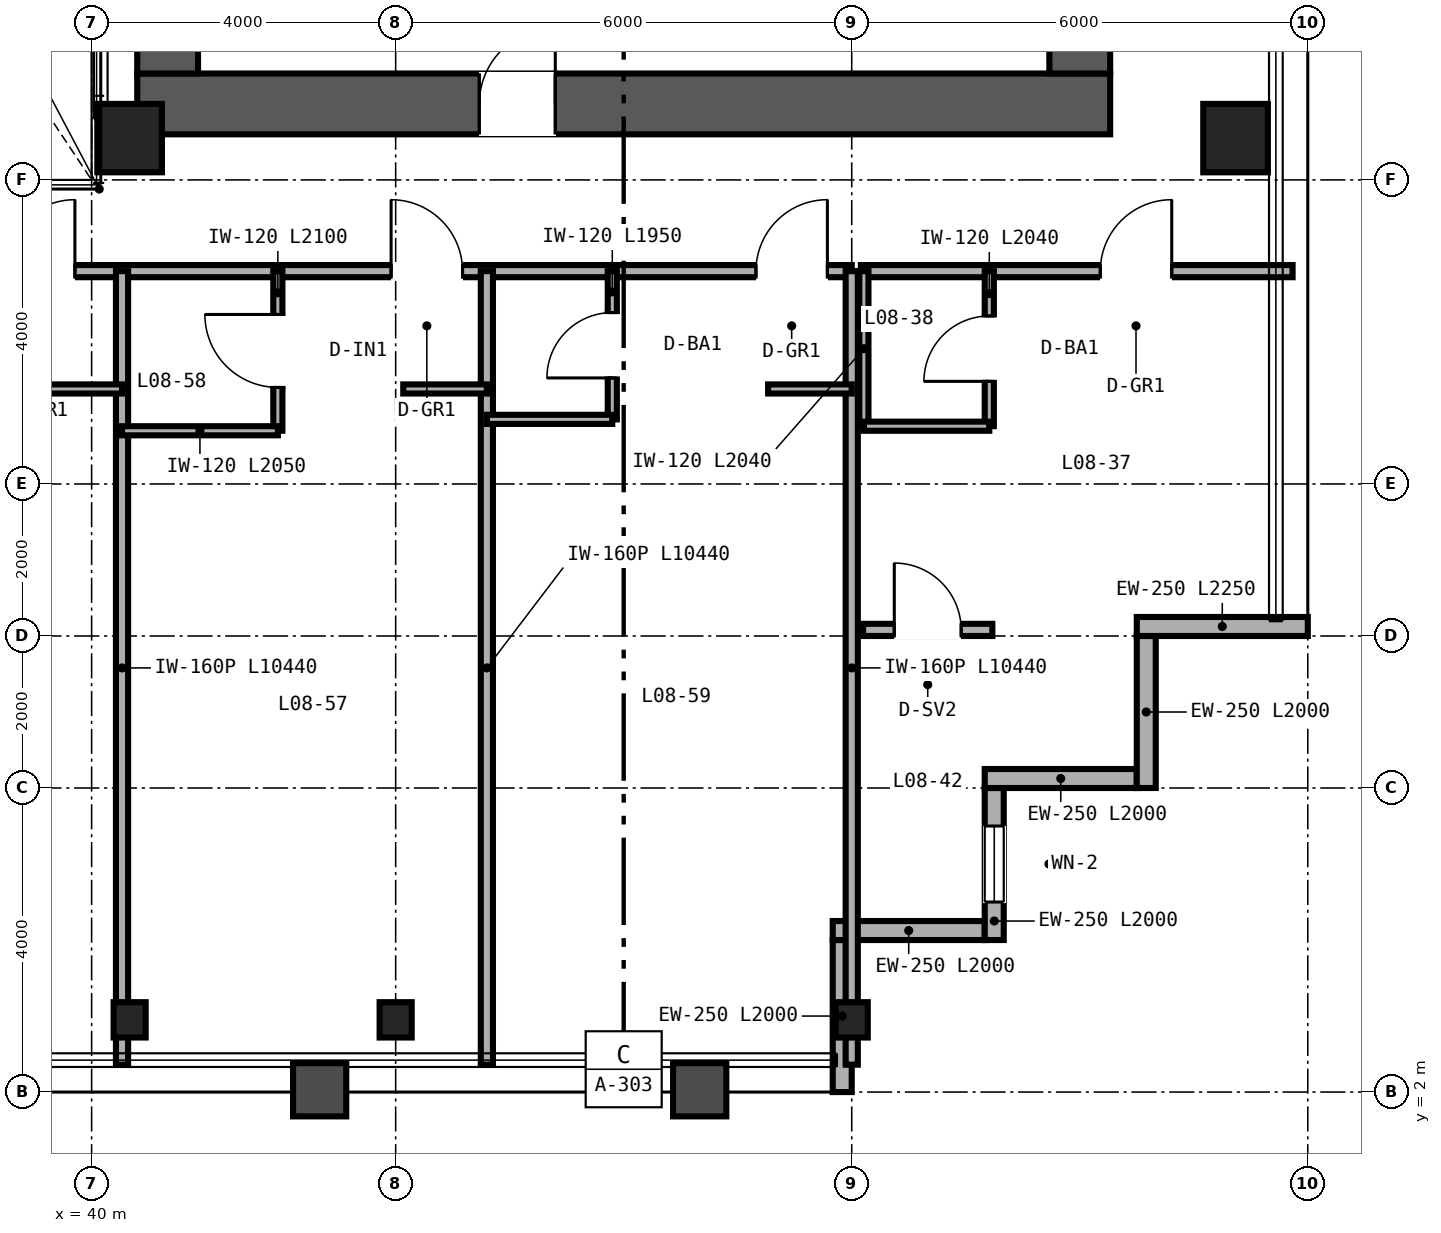
"""IFC4 building model, lengths in metres.
Left out: names, types, materials, properties, quantities, classifications, styles, units other than length and angle.
Written with IfcOpenShell. Run it as: python <this file> out.ifc"""

import sys

from ifc_helpers import new_model, si_unit, direction, frame, frame_2d, origin, origin_2d, place, context, subcontext, project, spatial, rectangle, hollow_rectangle, i_section, extrude, source, transform, mapped, element, fill, save


model = new_model("IFC4")
c1 = context("Model", 3, precision=1e-05, world=origin(), true_north=direction((0.0, 1.0)))
c2 = subcontext(c1, "Body", "Model", "MODEL_VIEW")
j1 = project(units=[si_unit("LENGTHUNIT", "METRE"), si_unit("PLANEANGLEUNIT", "RADIAN")], contexts=[c1])
p1 = place(None, origin())
s1 = spatial("IfcSite", under=j1, at=p1, CompositionType="ELEMENT")
p2 = place(p1, origin())
s2 = spatial("IfcBuilding", under=s1, at=p2, CompositionType="ELEMENT")
p3 = place(p2, frame((0.0, 0.0, 38.4)))
s3 = spatial("IfcBuildingStorey", under=s2, at=p3, CompositionType="ELEMENT", Elevation=38.4)
p4 = place(p3, frame((40.6, 15.0, 0.0), z_axis=(0.0, 0.0, 1.0), x_axis=(1.0, 0.0, 0.0)))
e1 = element("IfcWall", 1, at=p4, inside=s3, PredefinedType="SHEAR", context=c2, shape_type="SweptSolid", body=[
    extrude(rectangle(XDim=12.8, YDim=0.8, at=frame_2d((6.4, 0.0))), origin(), (0.0, 0.0, 1.0), 3.35),
])
p5 = place(p4, frame((4.5, 0.0, 0.0)))
e2 = element("IfcOpeningElement", 2, at=p5, cuts=e1, PredefinedType="OPENING", context=c2, shape_type="SweptSolid", body=[
    extrude(rectangle(XDim=1.0, YDim=2.15, at=frame_2d((0.5, 1.075))), frame((0.0, 0.41, 0.0), z_axis=(0.0, -1.0, 0.0), x_axis=(1.0, 0.0, 0.0)), (0.0, 0.0, 1.0), 0.82),
])
for number, where, z_axis, x_axis in (
    (3, (41.0, 15.4, 0.0), (0.0, 0.0, 1.0), (0.0, 1.0, 0.0)),
    (4, (53.0, 15.4, 0.0), (0.0, 0.0, 1.0), (0.0, 1.0, 0.0)),
):
    element("IfcWall", number, at=place(p3, frame(where, z_axis=z_axis, x_axis=x_axis)), inside=s3, PredefinedType="SHEAR", context=c2, shape_type="SweptSolid", body=[
        extrude(rectangle(XDim=21.2, YDim=0.8, at=frame_2d((10.6, 0.0))), origin(), (0.0, 0.0, 1.0), 3.35),
    ])
m1 = source(origin(), c2, "Body", "SweptSolid", [
    extrude(hollow_rectangle(XDim=0.85, YDim=0.9, WallThickness=0.04, at=origin_2d()), origin(), (0.0, 0.0, 1.0), 3.35),
])
for number, where, z_axis, x_axis in (
    (5, (40.5, 14.55, 0.0), (0.0, 0.0, 1.0), (1.0, 0.0, 0.0)),
    (6, (55.05, 14.55, 0.0), (0.0, 0.0, 1.0), (1.0, 0.0, 0.0)),
):
    element("IfcColumn", number, at=place(p3, frame(where, z_axis=z_axis, x_axis=x_axis)), inside=s3, PredefinedType="COLUMN", context=c2, shape_type="MappedRepresentation", body=[
        mapped(m1, transform((0.0, 0.0, 0.0), scale=1.0)),
    ])
m2 = source(origin(), c2, "Body", "SweptSolid", [
    extrude(i_section(OverallWidth=0.422, OverallDepth=0.465, WebThickness=0.045, FlangeThickness=0.073, FilletRadius=0.025, at=origin_2d()), origin(), (0.0, 0.0, 1.0), 3.35),
])
for number, where, z_axis, x_axis in (
    (7, (40.5, 2.95, 0.0), (0.0, 0.0, 1.0), (1.0, 0.0, 0.0)),
    (8, (44.0, 2.95, 0.0), (0.0, 0.0, 1.0), (1.0, 0.0, 0.0)),
    (9, (50.0, 2.95, 0.0), (0.0, 0.0, 1.0), (1.0, 0.0, 0.0)),
):
    element("IfcColumn", number, at=place(p3, frame(where, z_axis=z_axis, x_axis=x_axis)), inside=s3, PredefinedType="COLUMN", context=c2, shape_type="MappedRepresentation", body=[
        mapped(m2, transform((0.0, 0.0, 0.0), scale=1.0)),
    ])
p6 = place(p3, frame((49.875, 2.0, 0.0), z_axis=(0.0, 0.0, 1.0), x_axis=(0.0, 1.0, 0.0)))
e10 = element("IfcWall", 10, at=p6, inside=s3, PredefinedType="SOLIDWALL", context=c2, shape_type="SweptSolid", body=[
    extrude(rectangle(XDim=2.0, YDim=0.25, at=frame_2d((1.0, 0.0))), origin(), (0.0, 0.0, 1.0), 2.657),
])
p7 = place(p3, frame((49.75, 4.125, 0.0), z_axis=(0.0, 0.0, 1.0), x_axis=(1.0, 0.0, 0.0)))
e11 = element("IfcWall", 11, at=p7, inside=s3, PredefinedType="SOLIDWALL", context=c2, shape_type="SweptSolid", body=[
    extrude(rectangle(XDim=2.0, YDim=0.25, at=frame_2d((1.0, 0.0))), origin(), (0.0, 0.0, 1.0), 3.35),
])
p8 = place(p3, frame((51.875, 4.0, 0.0), z_axis=(0.0, 0.0, 1.0), x_axis=(0.0, 1.0, 0.0)))
e12 = element("IfcWall", 12, at=p8, inside=s3, PredefinedType="SOLIDWALL", context=c2, shape_type="SweptSolid", body=[
    extrude(rectangle(XDim=2.0, YDim=0.25, at=frame_2d((1.0, 0.0))), origin(), (0.0, 0.0, 1.0), 3.35),
])
p9 = place(p8, frame((0.5, 0.0, 0.85)))
e13 = element("IfcOpeningElement", 13, at=p9, cuts=e12, PredefinedType="OPENING", context=c2, shape_type="SweptSolid", body=[
    extrude(rectangle(XDim=1.0, YDim=1.9, at=frame_2d((0.5, 0.95))), frame((0.0, 0.135, 0.0), z_axis=(0.0, -1.0, 0.0), x_axis=(1.0, 0.0, 0.0)), (0.0, 0.0, 1.0), 0.27),
])
for number, where, z_axis, x_axis in (
    (14, (51.75, 6.125, 0.0), (0.0, 0.0, 1.0), (1.0, 0.0, 0.0)),
    (15, (53.875, 6.0, 0.0), (0.0, 0.0, 1.0), (0.0, 1.0, 0.0)),
):
    element("IfcWall", number, at=place(p3, frame(where, z_axis=z_axis, x_axis=x_axis)), inside=s3, PredefinedType="SOLIDWALL", context=c2, shape_type="SweptSolid", body=[
        extrude(rectangle(XDim=2.0, YDim=0.25, at=frame_2d((1.0, 0.0))), origin(), (0.0, 0.0, 1.0), 3.35),
    ])
p10 = place(p3, frame((53.75, 8.125, 0.0), z_axis=(0.0, 0.0, 1.0), x_axis=(1.0, 0.0, 0.0)))
e16 = element("IfcWall", 16, at=p10, inside=s3, PredefinedType="SOLIDWALL", context=c2, shape_type="SweptSolid", body=[
    extrude(rectangle(XDim=2.25, YDim=0.25, at=frame_2d((1.125, 0.0))), origin(), (0.0, 0.0, 1.0), 3.35),
])
p11 = place(p3, frame((50.12, 12.8, 0.0), z_axis=(0.0, 0.0, 1.0), x_axis=(1.0, 0.0, 0.0)))
e17 = element("IfcWall", 17, at=p11, inside=s3, PredefinedType="PARTITIONING", context=c2, shape_type="SweptSolid", body=[
    extrude(rectangle(XDim=5.68, YDim=0.16, at=frame_2d((2.84, 0.0))), origin(), (0.0, 0.0, 1.0), 3.35),
])
p12 = place(p11, frame((3.15, 0.0, 0.0)))
e18 = element("IfcOpeningElement", 18, at=p12, cuts=e17, PredefinedType="OPENING", context=c2, shape_type="SweptSolid", body=[
    extrude(rectangle(XDim=0.94, YDim=2.15, at=frame_2d((0.47, 1.075))), frame((0.0, 0.09, 0.0), z_axis=(0.0, -1.0, 0.0), x_axis=(1.0, 0.0, 0.0)), (0.0, 0.0, 1.0), 0.18),
])
p13 = place(p3, frame((51.81, 10.76, 0.0), z_axis=(0.0, 0.0, 1.0), x_axis=(0.0, 1.0, 0.0)))
e19 = element("IfcWall", 19, at=p13, inside=s3, PredefinedType="PARTITIONING", context=c2, shape_type="SweptSolid", body=[
    extrude(rectangle(XDim=2.04, YDim=0.12, at=frame_2d((1.02, 0.0))), origin(), (0.0, 0.0, 1.0), 3.35),
])
p14 = place(p13, frame((0.59, 0.0, 0.0)))
e20 = element("IfcOpeningElement", 20, at=p14, cuts=e19, PredefinedType="OPENING", context=c2, shape_type="SweptSolid", body=[
    extrude(rectangle(XDim=0.86, YDim=2.1, at=frame_2d((0.43, 1.05))), frame((0.0, 0.07, 0.0), z_axis=(0.0, -1.0, 0.0), x_axis=(1.0, 0.0, 0.0)), (0.0, 0.0, 1.0), 0.14),
])
p15 = place(p3, frame((50.16, 10.76, 0.0), z_axis=(0.0, 0.0, 1.0), x_axis=(0.0, 1.0, 0.0)))
e21 = element("IfcWall", 21, at=p15, inside=s3, PredefinedType="PARTITIONING", context=c2, shape_type="SweptSolid", body=[
    extrude(rectangle(XDim=2.04, YDim=0.12, at=frame_2d((1.02, 0.0))), origin(), (0.0, 0.0, 1.0), 3.35),
])
p16 = place(p3, frame((50.16, 10.76, 0.0), z_axis=(0.0, 0.0, 1.0), x_axis=(1.0, 0.0, 0.0)))
e22 = element("IfcWall", 22, at=p16, inside=s3, PredefinedType="PARTITIONING", context=c2, shape_type="SweptSolid", body=[
    extrude(rectangle(XDim=1.65, YDim=0.12, at=frame_2d((0.825, 0.0))), origin(), (0.0, 0.0, 1.0), 3.35),
])
p17 = place(p3, frame((50.15, 8.08, 0.0), z_axis=(0.0, 0.0, 1.0), x_axis=(1.0, 0.0, 0.0)))
e23 = element("IfcWall", 23, at=p17, inside=s3, PredefinedType="PARTITIONING", context=c2, shape_type="SweptSolid", body=[
    extrude(rectangle(XDim=1.7, YDim=0.16, at=frame_2d((0.85, 0.0))), origin(), (0.0, 0.0, 1.0), 3.35),
])
p18 = place(p17, frame((0.41, 0.0, 0.0)))
e24 = element("IfcOpeningElement", 24, at=p18, cuts=e23, PredefinedType="OPENING", context=c2, shape_type="SweptSolid", body=[
    extrude(rectangle(XDim=0.88, YDim=2.15, at=frame_2d((0.44, 1.075))), frame((0.0, 0.09, 0.0), z_axis=(0.0, -1.0, 0.0), x_axis=(1.0, 0.0, 0.0)), (0.0, 0.0, 1.0), 0.18),
])
p19 = place(p3, frame((14.0, 12.8, 0.0), z_axis=(0.0, 0.0, 1.0), x_axis=(1.0, 0.0, 0.0)))
e25 = element("IfcWall", 25, at=p19, inside=s3, PredefinedType="PARTITIONING", context=c2, shape_type="SweptSolid", body=[
    extrude(rectangle(XDim=36.0, YDim=0.16, at=frame_2d((18.0, 0.0))), origin(), (0.0, 0.0, 1.0), 2.571),
])
p20 = place(p19, frame((2.94, 0.0, 0.0)))
e26 = element("IfcOpeningElement", 26, at=p20, cuts=e25, PredefinedType="OPENING", context=c2, shape_type="SweptSolid", body=[
    extrude(rectangle(XDim=0.94, YDim=2.15, at=frame_2d((0.47, 1.075))), frame((0.0, 0.09, 0.0), z_axis=(0.0, -1.0, 0.0), x_axis=(1.0, 0.0, 0.0)), (0.0, 0.0, 1.0), 0.18),
])
p21 = place(p19, frame((7.14, 0.0, 0.0)))
e27 = element("IfcOpeningElement", 27, at=p21, cuts=e25, PredefinedType="OPENING", context=c2, shape_type="SweptSolid", body=[
    extrude(rectangle(XDim=0.94, YDim=2.15, at=frame_2d((0.47, 1.075))), frame((0.0, 0.09, 0.0), z_axis=(0.0, -1.0, 0.0), x_axis=(1.0, 0.0, 0.0)), (0.0, 0.0, 1.0), 0.18),
])
p22 = place(p19, frame((11.54, 0.0, 0.0)))
e28 = element("IfcOpeningElement", 28, at=p22, cuts=e25, PredefinedType="OPENING", context=c2, shape_type="SweptSolid", body=[
    extrude(rectangle(XDim=0.94, YDim=2.15, at=frame_2d((0.47, 1.075))), frame((0.0, 0.09, 0.0), z_axis=(0.0, -1.0, 0.0), x_axis=(1.0, 0.0, 0.0)), (0.0, 0.0, 1.0), 0.18),
])
p23 = place(p19, frame((15.94, 0.0, 0.0)))
e29 = element("IfcOpeningElement", 29, at=p23, cuts=e25, PredefinedType="OPENING", context=c2, shape_type="SweptSolid", body=[
    extrude(rectangle(XDim=0.94, YDim=2.15, at=frame_2d((0.47, 1.075))), frame((0.0, 0.09, 0.0), z_axis=(0.0, -1.0, 0.0), x_axis=(1.0, 0.0, 0.0)), (0.0, 0.0, 1.0), 0.18),
])
p24 = place(p19, frame((20.54, 0.0, 0.0)))
e30 = element("IfcOpeningElement", 30, at=p24, cuts=e25, PredefinedType="OPENING", context=c2, shape_type="SweptSolid", body=[
    extrude(rectangle(XDim=0.94, YDim=2.15, at=frame_2d((0.47, 1.075))), frame((0.0, 0.09, 0.0), z_axis=(0.0, -1.0, 0.0), x_axis=(1.0, 0.0, 0.0)), (0.0, 0.0, 1.0), 0.18),
])
p25 = place(p19, frame((24.84, 0.0, 0.0)))
e31 = element("IfcOpeningElement", 31, at=p25, cuts=e25, PredefinedType="OPENING", context=c2, shape_type="SweptSolid", body=[
    extrude(rectangle(XDim=0.94, YDim=2.15, at=frame_2d((0.47, 1.075))), frame((0.0, 0.09, 0.0), z_axis=(0.0, -1.0, 0.0), x_axis=(1.0, 0.0, 0.0)), (0.0, 0.0, 1.0), 0.18),
])
p26 = place(p19, frame((29.94, 0.0, 0.0)))
e32 = element("IfcOpeningElement", 32, at=p26, cuts=e25, PredefinedType="OPENING", context=c2, shape_type="SweptSolid", body=[
    extrude(rectangle(XDim=0.94, YDim=2.15, at=frame_2d((0.47, 1.075))), frame((0.0, 0.09, 0.0), z_axis=(0.0, -1.0, 0.0), x_axis=(1.0, 0.0, 0.0)), (0.0, 0.0, 1.0), 0.18),
])
p27 = place(p19, frame((34.74, 0.0, 0.0)))
e33 = element("IfcOpeningElement", 33, at=p27, cuts=e25, PredefinedType="OPENING", context=c2, shape_type="SweptSolid", body=[
    extrude(rectangle(XDim=0.94, YDim=2.15, at=frame_2d((0.47, 1.075))), frame((0.0, 0.09, 0.0), z_axis=(0.0, -1.0, 0.0), x_axis=(1.0, 0.0, 0.0)), (0.0, 0.0, 1.0), 0.18),
])
p28 = place(p3, frame((50.0, 2.36, 0.0), z_axis=(0.0, 0.0, 1.0), x_axis=(0.0, 1.0, 0.0)))
e34 = element("IfcWall", 34, at=p28, inside=s3, PredefinedType="PARTITIONING", context=c2, shape_type="SweptSolid", body=[
    extrude(rectangle(XDim=10.44, YDim=0.16, at=frame_2d((5.22, 0.0))), origin(), (0.0, 0.0, 1.0), 2.657),
])
p29 = place(p3, frame((40.4, 2.36, 0.0), z_axis=(0.0, 0.0, 1.0), x_axis=(0.0, 1.0, 0.0)))
e35 = element("IfcWall", 35, at=p29, inside=s3, PredefinedType="PARTITIONING", context=c2, shape_type="SweptSolid", body=[
    extrude(rectangle(XDim=10.44, YDim=0.16, at=frame_2d((5.22, 0.0))), origin(), (0.0, 0.0, 1.0), 2.423),
])
p30 = place(p3, frame((39.3, 11.25, 0.0), z_axis=(0.0, 0.0, 1.0), x_axis=(1.0, 0.0, 0.0)))
e36 = element("IfcWall", 36, at=p30, inside=s3, PredefinedType="PARTITIONING", context=c2, shape_type="SweptSolid", body=[
    extrude(rectangle(XDim=1.1, YDim=0.12, at=frame_2d((0.55, 0.0))), origin(), (0.0, 0.0, 1.0), 2.571),
])
p31 = place(p3, frame((45.2, 2.36, 0.0), z_axis=(0.0, 0.0, 1.0), x_axis=(0.0, 1.0, 0.0)))
e37 = element("IfcWall", 37, at=p31, inside=s3, PredefinedType="PARTITIONING", context=c2, shape_type="SweptSolid", body=[
    extrude(rectangle(XDim=10.44, YDim=0.16, at=frame_2d((5.22, 0.0))), origin(), (0.0, 0.0, 1.0), 2.657),
])
p32 = place(p3, frame((42.45, 10.7, 0.0), z_axis=(0.0, 0.0, 1.0), x_axis=(0.0, 1.0, 0.0)))
e38 = element("IfcWall", 38, at=p32, inside=s3, PredefinedType="PARTITIONING", context=c2, shape_type="SweptSolid", body=[
    extrude(rectangle(XDim=2.1, YDim=0.12, at=frame_2d((1.05, 0.0))), origin(), (0.0, 0.0, 1.0), 3.35),
])
p33 = place(p32, frame((0.57, 0.0, 0.0)))
e39 = element("IfcOpeningElement", 39, at=p33, cuts=e38, PredefinedType="OPENING", context=c2, shape_type="SweptSolid", body=[
    extrude(rectangle(XDim=0.96, YDim=2.15, at=frame_2d((0.48, 1.075))), frame((0.0, 0.07, 0.0), z_axis=(0.0, -1.0, 0.0), x_axis=(1.0, 0.0, 0.0)), (0.0, 0.0, 1.0), 0.14),
])
p34 = place(p3, frame((40.4, 10.7, 0.0), z_axis=(0.0, 0.0, 1.0), x_axis=(1.0, 0.0, 0.0)))
e40 = element("IfcWall", 40, at=p34, inside=s3, PredefinedType="PARTITIONING", context=c2, shape_type="SweptSolid", body=[
    extrude(rectangle(XDim=2.05, YDim=0.12, at=frame_2d((1.025, 0.0))), origin(), (0.0, 0.0, 1.0), 2.571),
])
p35 = place(p3, frame((44.1, 11.25, 0.0), z_axis=(0.0, 0.0, 1.0), x_axis=(1.0, 0.0, 0.0)))
e41 = element("IfcWall", 41, at=p35, inside=s3, PredefinedType="PARTITIONING", context=c2, shape_type="SweptSolid", body=[
    extrude(rectangle(XDim=1.1, YDim=0.12, at=frame_2d((0.55, 0.0))), origin(), (0.0, 0.0, 1.0), 3.35),
])
p36 = place(p3, frame((46.85, 10.85, 0.0), z_axis=(0.0, 0.0, 1.0), x_axis=(0.0, 1.0, 0.0)))
e42 = element("IfcWall", 42, at=p36, inside=s3, PredefinedType="PARTITIONING", context=c2, shape_type="SweptSolid", body=[
    extrude(rectangle(XDim=1.95, YDim=0.12, at=frame_2d((0.975, 0.0))), origin(), (0.0, 0.0, 1.0), 3.35),
])
p37 = place(p36, frame((0.545, 0.0, 0.0)))
e43 = element("IfcOpeningElement", 43, at=p37, cuts=e42, PredefinedType="OPENING", context=c2, shape_type="SweptSolid", body=[
    extrude(rectangle(XDim=0.86, YDim=2.1, at=frame_2d((0.43, 1.05))), frame((0.0, 0.07, 0.0), z_axis=(0.0, -1.0, 0.0), x_axis=(1.0, 0.0, 0.0)), (0.0, 0.0, 1.0), 0.14),
])
p38 = place(p3, frame((45.2, 10.85, 0.0), z_axis=(0.0, 0.0, 1.0), x_axis=(1.0, 0.0, 0.0)))
e44 = element("IfcWall", 44, at=p38, inside=s3, PredefinedType="PARTITIONING", context=c2, shape_type="SweptSolid", body=[
    extrude(rectangle(XDim=1.65, YDim=0.12, at=frame_2d((0.825, 0.0))), origin(), (0.0, 0.0, 1.0), 3.35),
])
p39 = place(p3, frame((48.9, 11.25, 0.0), z_axis=(0.0, 0.0, 1.0), x_axis=(1.0, 0.0, 0.0)))
e45 = element("IfcWall", 45, at=p39, inside=s3, PredefinedType="PARTITIONING", context=c2, shape_type="SweptSolid", body=[
    extrude(rectangle(XDim=1.1, YDim=0.12, at=frame_2d((0.55, 0.0))), origin(), (0.0, 0.0, 1.0), 3.35),
])
m3 = source(origin(), c2, "Body", "SweptSolid", [
    extrude(rectangle(XDim=1.0, YDim=1.9, at=frame_2d((0.5, 0.95))), frame((0.0, 0.03, 0.0), z_axis=(0.0, -1.0, 0.0), x_axis=(1.0, 0.0, 0.0)), (0.0, 0.0, 1.0), 0.06),
])
p40 = place(p9, origin())
e46 = element("IfcWindow", 46, at=p40, inside=s3, PartitioningType="SINGLE_PANEL", PredefinedType="WINDOW", context=c2, shape_type="MappedRepresentation", body=[
    mapped(m3, transform((0.0, 0.0, 0.0), scale=1.0)),
])
fill(e13, e46)
m4 = source(origin(), c2, "Body", "SweptSolid", [
    extrude(rectangle(XDim=1.0, YDim=2.15, at=frame_2d((0.5, 1.075))), frame((0.0, 0.025, 0.0), z_axis=(0.0, -1.0, 0.0), x_axis=(1.0, 0.0, 0.0)), (0.0, 0.0, 1.0), 0.05),
])
p41 = place(p5, origin())
e47 = element("IfcDoor", 47, at=p41, inside=s3, OperationType="SINGLE_SWING_RIGHT", PredefinedType="DOOR", context=c2, shape_type="MappedRepresentation", body=[
    mapped(m4, transform((0.0, 0.0, 0.0), scale=1.0)),
])
fill(e2, e47)
m5 = source(origin(), c2, "Body", "SweptSolid", [
    extrude(rectangle(XDim=0.86, YDim=2.1, at=frame_2d((0.43, 1.05))), frame((0.0, 0.025, 0.0), z_axis=(0.0, -1.0, 0.0), x_axis=(1.0, 0.0, 0.0)), (0.0, 0.0, 1.0), 0.05),
])
p42 = place(p14, origin())
e48 = element("IfcDoor", 48, at=p42, inside=s3, OperationType="SINGLE_SWING_LEFT", PredefinedType="DOOR", context=c2, shape_type="MappedRepresentation", body=[
    mapped(m5, transform((0.0, 0.0, 0.0), scale=1.0)),
])
fill(e20, e48)
m6 = source(origin(), c2, "Body", "SweptSolid", [
    extrude(rectangle(XDim=0.94, YDim=2.15, at=frame_2d((0.47, 1.075))), frame((0.0, 0.025, 0.0), z_axis=(0.0, -1.0, 0.0), x_axis=(1.0, 0.0, 0.0)), (0.0, 0.0, 1.0), 0.05),
])
p43 = place(p12, origin())
e49 = element("IfcDoor", 49, at=p43, inside=s3, OperationType="SINGLE_SWING_RIGHT", PredefinedType="DOOR", context=c2, shape_type="MappedRepresentation", body=[
    mapped(m6, transform((0.0, 0.0, 0.0), scale=1.0)),
])
fill(e18, e49)
m7 = source(origin(), c2, "Body", "SweptSolid", [
    extrude(rectangle(XDim=0.88, YDim=2.15, at=frame_2d((0.44, 1.075))), frame((0.0, 0.025, 0.0), z_axis=(0.0, -1.0, 0.0), x_axis=(1.0, 0.0, 0.0)), (0.0, 0.0, 1.0), 0.05),
])
p44 = place(p18, origin())
e50 = element("IfcDoor", 50, at=p44, inside=s3, OperationType="SINGLE_SWING_LEFT", PredefinedType="DOOR", context=c2, shape_type="MappedRepresentation", body=[
    mapped(m7, transform((0.0, 0.0, 0.0), scale=1.0)),
])
fill(e24, e50)
m8 = source(origin(), c2, "Body", "SweptSolid", [
    extrude(rectangle(XDim=0.96, YDim=2.15, at=frame_2d((0.48, 1.075))), frame((0.0, 0.025, 0.0), z_axis=(0.0, -1.0, 0.0), x_axis=(1.0, 0.0, 0.0)), (0.0, 0.0, 1.0), 0.05),
])
p45 = place(p33, origin())
e51 = element("IfcDoor", 51, at=p45, inside=s3, OperationType="SINGLE_SWING_RIGHT", PredefinedType="DOOR", context=c2, shape_type="MappedRepresentation", body=[
    mapped(m8, transform((0.0, 0.0, 0.0), scale=1.0)),
])
fill(e39, e51)
p46 = place(p37, origin())
e52 = element("IfcDoor", 52, at=p46, inside=s3, OperationType="SINGLE_SWING_LEFT", PredefinedType="DOOR", context=c2, shape_type="MappedRepresentation", body=[
    mapped(m5, transform((0.0, 0.0, 0.0), scale=1.0)),
])
fill(e43, e52)
p47 = place(p25, origin())
e53 = element("IfcDoor", 53, at=p47, inside=s3, OperationType="SINGLE_SWING_RIGHT", PredefinedType="DOOR", context=c2, shape_type="MappedRepresentation", body=[
    mapped(m6, transform((0.0, 0.0, 0.0), scale=1.0)),
])
fill(e31, e53)
p48 = place(p26, origin())
e54 = element("IfcDoor", 54, at=p48, inside=s3, OperationType="SINGLE_SWING_LEFT", PredefinedType="DOOR", context=c2, shape_type="MappedRepresentation", body=[
    mapped(m6, transform((0.0, 0.0, 0.0), scale=1.0)),
])
fill(e32, e54)
p49 = place(p27, origin())
e55 = element("IfcDoor", 55, at=p49, inside=s3, OperationType="SINGLE_SWING_RIGHT", PredefinedType="DOOR", context=c2, shape_type="MappedRepresentation", body=[
    mapped(m6, transform((0.0, 0.0, 0.0), scale=1.0)),
])
fill(e33, e55)
save(model, sys.argv[1])
